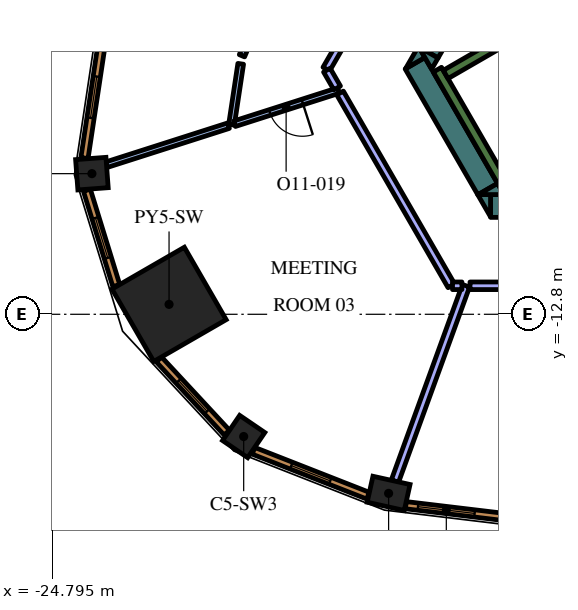
"""IFC4 building model, lengths in metres.
Left out: names, types, materials, properties, quantities, classifications, styles, units other than length and angle.
Written with IfcOpenShell. Run it as: python <this file> out.ifc"""

import sys

from ifc_helpers import new_model, si_unit, direction, frame, frame_2d, origin, origin_2d, place, context, subcontext, project, spatial, polyline, rectangle, outline, extrude, element, fill, save


model = new_model("IFC4")
c1 = context("Model", 3, precision=1e-05, world=origin(), true_north=direction((0.0, 1.0)))
c2 = subcontext(c1, "Body", "Model", "MODEL_VIEW")
j1 = project(units=[si_unit("LENGTHUNIT", "METRE"), si_unit("PLANEANGLEUNIT", "RADIAN")], contexts=[c1])
p1 = place(None, origin())
s1 = spatial("IfcSite", under=j1, at=p1, CompositionType="ELEMENT")
p2 = place(p1, origin())
s2 = spatial("IfcBuilding", under=s1, at=p2, CompositionType="ELEMENT")
p3 = place(p2, frame((0.0, 0.0, 267.0)))
s3 = spatial("IfcBuildingStorey", under=s2, at=p3, CompositionType="ELEMENT", Elevation=267.0)
p4 = place(p3, frame((-21.718, -12.539, 0.0), z_axis=(0.0, 0.0, 1.0), x_axis=(-0.866025403784, -0.5, 0.0)))
e1 = element("IfcColumn", 1, at=p4, inside=s3, PredefinedType="COLUMN", context=c2, shape_type="SweptSolid", body=[
    extrude(rectangle(XDim=2.2, YDim=2.2, at=origin_2d()), origin(), (0.0, 0.0, 1.0), 4.2),
])
p5 = place(p3, frame((-15.941, -17.512, 0.0), z_axis=(0.0, 0.0, 1.0), x_axis=(0.976233636503, -0.216720758026, 0.0)))
e2 = element("IfcColumn", 2, at=p5, inside=s3, PredefinedType="COLUMN", context=c2, shape_type="SweptSolid", body=[
    extrude(rectangle(XDim=1.0, YDim=0.7, at=origin_2d()), origin(), (0.0, 0.0, 1.0), 4.2),
])
for number, where, z_axis, x_axis in (
    (3, (-23.748, -9.1, 0.0), (0.0, 0.0, 1.0), (0.075, -0.997, 0.0)),
    (4, (-19.754, -16.017, 0.0), (0.0, 0.0, 1.0), (0.826, -0.563, 0.0)),
):
    element("IfcColumn", number, at=place(p3, frame(where, z_axis=z_axis, x_axis=x_axis)), inside=s3, PredefinedType="COLUMN", context=c2, shape_type="SweptSolid", body=[
        extrude(rectangle(XDim=0.8, YDim=0.8, at=origin_2d()), origin(), (0.0, 0.0, 1.0), 4.2),
    ])
p6 = place(p3, frame((8.904, -9.95, 0.0), z_axis=(0.0, 0.0, 1.0), x_axis=(-1.0, 0.0, 0.0)))
e5 = element("IfcWall", 5, at=p6, inside=s3, PredefinedType="SOLIDWALL", context=c2, shape_type="SweptSolid", body=[
    extrude(rectangle(XDim=22.161, YDim=0.6, at=frame_2d((11.081, 0.0))), origin(), (0.0, 0.0, 1.0), 4.2),
])
p7 = place(p3, origin())
e6 = element("IfcWall", 6, at=p7, inside=s3, PredefinedType="SOLIDWALL", context=c2, shape_type="SweptSolid", body=[
    extrude(outline(polyline([(-13.597, -9.65), (-13.259, -9.65), (-13.259, -10.236), (-13.597, -9.65)])), origin(), (0.0, 0.0, 1.0), 4.2),
])
p8 = place(p3, frame((-13.333, -9.506, 0.0), z_axis=(0.0, 0.0, 1.0), x_axis=(-0.500019073792, 0.866014391245, 0.0)))
e7 = element("IfcWall", 7, at=p8, inside=s3, PredefinedType="SOLIDWALL", context=c2, shape_type="SweptSolid", body=[
    extrude(rectangle(XDim=3.823, YDim=0.6, at=frame_2d((1.912, 0.0))), origin(), (0.0, 0.0, 1.0), 4.2),
])
e8 = element("IfcWall", 8, at=p7, inside=s3, PredefinedType="SOLIDWALL", context=c2, shape_type="SweptSolid", body=[
    extrude(outline(polyline([(-14.987, -6.043), (-15.493, -6.335), (-15.156, -5.75), (-14.987, -6.043)])), origin(), (0.0, 0.0, 1.0), 4.2),
])
e9 = element("IfcWall", 9, at=p7, inside=s3, PredefinedType="SOLIDWALL", context=c2, shape_type="SweptSolid", body=[
    extrude(outline(polyline([(-12.904, -9.65), (-13.58, -9.65), (-13.073, -9.357), (-12.904, -9.65)])), origin(), (0.0, 0.0, 1.0), 4.2),
])
p9 = place(p3, frame((-13.432, -3.364, 0.0), z_axis=(0.0, 0.0, 1.0), x_axis=(-0.499960127962, -0.866048422692, 0.0)))
e10 = element("IfcWall", 10, at=p9, inside=s3, PredefinedType="SOLIDWALL", context=c2, shape_type="SweptSolid", body=[
    extrude(rectangle(XDim=2.934, YDim=0.6, at=frame_2d((1.467, 0.0))), origin(), (0.0, 0.0, 1.0), 4.2),
])
e11 = element("IfcWall", 11, at=p7, inside=s3, PredefinedType="SOLIDWALL", context=c2, shape_type="SweptSolid", body=[
    extrude(outline(polyline([(-14.809, -6.35), (-15.147, -5.764), (-14.64, -6.057), (-14.809, -6.35)])), origin(), (0.0, 0.0, 1.0), 4.2),
])
p10 = place(p3, frame((-12.84, -9.511, 0.0), z_axis=(0.0, 0.0, 1.0), x_axis=(-0.499997733992, 0.866026712061, 0.0)))
e12 = element("IfcWall", 12, at=p10, inside=s3, PredefinedType="SOLIDWALL", context=c2, shape_type="SweptSolid", body=[
    extrude(rectangle(XDim=3.634, YDim=0.25, at=frame_2d((1.817, 0.0))), origin(), (0.0, 0.0, 1.0), 4.2),
])
p11 = place(p3, frame((-14.44, -6.49, 0.0), z_axis=(0.0, 0.0, 1.0), x_axis=(0.866022966069, 0.500004222222, 0.0)))
e13 = element("IfcWall", 13, at=p11, inside=s3, PredefinedType="SOLIDWALL", context=c2, shape_type="SweptSolid", body=[
    extrude(rectangle(XDim=6.8, YDim=0.25, at=frame_2d((3.4, 0.0))), origin(), (0.0, 0.0, 1.0), 4.2),
])
p12 = place(p3, frame((-15.774, -17.19, 0.0), z_axis=(0.0, 0.0, 1.0), x_axis=(0.341821907823, 0.93976474893, 0.0)))
e14 = element("IfcWall", 14, at=p12, inside=s3, PredefinedType="PARTITIONING", context=c2, shape_type="SweptSolid", body=[
    extrude(rectangle(XDim=5.469, YDim=0.2, at=frame_2d((2.735, 0.0))), origin(), (0.0, 0.0, 1.0), 3.55),
])
p13 = place(p3, frame((-13.799, -12.05, 0.0), z_axis=(0.0, 0.0, 1.0), x_axis=(1.0, 0.0, 0.0)))
e15 = element("IfcWall", 15, at=p13, inside=s3, PredefinedType="PARTITIONING", context=c2, shape_type="SweptSolid", body=[
    extrude(rectangle(XDim=7.769, YDim=0.2, at=frame_2d((3.884, 0.0))), origin(), (0.0, 0.0, 1.0), 3.55),
])
p14 = place(p3, frame((-19.8, -5.998, 0.0), z_axis=(0.0, 0.0, 1.0), x_axis=(0.39332238233, 0.919400621904, 0.0)))
e16 = element("IfcWall", 16, at=p14, inside=s3, PredefinedType="PARTITIONING", context=c2, shape_type="SweptSolid", body=[
    extrude(rectangle(XDim=5.431, YDim=0.15, at=frame_2d((2.715, 0.0))), origin(), (0.0, 0.0, 1.0), 3.55),
])
p15 = place(p14, frame((2.231, 0.0, 0.0)))
e17 = element("IfcOpeningElement", 17, at=p15, cuts=e16, PredefinedType="OPENING", context=c2, shape_type="SweptSolid", body=[
    extrude(rectangle(XDim=0.9, YDim=2.1, at=frame_2d((0.45, 1.05))), frame((0.0, 0.085, 0.0), z_axis=(0.0, -1.0, 0.0), x_axis=(1.0, 0.0, 0.0)), (0.0, 0.0, 1.0), 0.17),
])
p16 = place(p3, frame((-19.833, -6.21, 0.0), z_axis=(0.0, 0.0, 1.0), x_axis=(-0.149305499664, -0.988791114326, 0.0)))
e18 = element("IfcWall", 18, at=p16, inside=s3, PredefinedType="PARTITIONING", context=c2, shape_type="SweptSolid", body=[
    extrude(rectangle(XDim=1.62, YDim=0.15, at=frame_2d((0.81, 0.0))), origin(), (0.0, 0.0, 1.0), 3.55),
])
p17 = place(p3, frame((-20.154, -7.838, 0.0), z_axis=(0.0, 0.0, 1.0), x_axis=(-0.952501497002, -0.304533903217, 0.0)))
e19 = element("IfcWall", 19, at=p17, inside=s3, PredefinedType="PARTITIONING", context=c2, shape_type="SweptSolid", body=[
    extrude(rectangle(XDim=3.37, YDim=0.15, at=frame_2d((1.685, 0.0))), origin(), (0.0, 0.0, 1.0), 3.55),
])
p18 = place(p3, frame((-17.256, -6.911, 0.0), z_axis=(0.0, 0.0, 1.0), x_axis=(-0.95247639241, -0.304612412587, 0.0)))
e20 = element("IfcWall", 20, at=p18, inside=s3, PredefinedType="PARTITIONING", context=c2, shape_type="SweptSolid", body=[
    extrude(rectangle(XDim=2.875, YDim=0.15, at=frame_2d((1.438, 0.0))), origin(), (0.0, 0.0, 1.0), 3.55),
])
p19 = place(p18, frame((1.0, 0.0, 0.0)))
e21 = element("IfcOpeningElement", 21, at=p19, cuts=e20, PredefinedType="OPENING", context=c2, shape_type="SweptSolid", body=[
    extrude(rectangle(XDim=0.9, YDim=2.1, at=frame_2d((0.45, 1.05))), frame((0.0, 0.085, 0.0), z_axis=(0.0, -1.0, 0.0), x_axis=(1.0, 0.0, 0.0)), (0.0, 0.0, 1.0), 0.17),
])
p20 = place(p3, frame((-13.451, 0.803, 0.0), z_axis=(0.0, 0.0, 1.0), x_axis=(-0.499982585408, -0.86603545787, 0.0)))
e22 = element("IfcWall", 22, at=p20, inside=s3, PredefinedType="PARTITIONING", context=c2, shape_type="SweptSolid", body=[
    extrude(rectangle(XDim=8.26, YDim=0.2, at=frame_2d((4.13, 0.0))), origin(), (0.0, 0.0, 1.0), 3.55),
])
p21 = place(p3, frame((-17.565, -6.376, 0.0), z_axis=(0.0, 0.0, 1.0), x_axis=(0.499683376352, -0.866208129376, 0.0)))
e23 = element("IfcWall", 23, at=p21, inside=s3, PredefinedType="PARTITIONING", context=c2, shape_type="SweptSolid", body=[
    extrude(rectangle(XDim=0.541, YDim=0.2, at=frame_2d((0.271, 0.0))), origin(), (0.0, 0.0, 1.0), 3.55),
])
p22 = place(p3, frame((-17.218, -6.978, 0.0), z_axis=(0.0, 0.0, 1.0), x_axis=(0.500012299885, -0.866018302326, 0.0)))
e24 = element("IfcWall", 24, at=p22, inside=s3, PredefinedType="PARTITIONING", context=c2, shape_type="SweptSolid", body=[
    extrude(rectangle(XDim=5.857, YDim=0.2, at=frame_2d((2.929, 0.0))), origin(), (0.0, 0.0, 1.0), 3.55),
])
p23 = place(p3, frame((-14.26, -12.05, 0.0), z_axis=(0.0, 0.0, 1.0), x_axis=(1.0, 0.0, 0.0)))
e25 = element("IfcWall", 25, at=p23, inside=s3, PredefinedType="PARTITIONING", context=c2, shape_type="SweptSolid", body=[
    extrude(rectangle(XDim=0.248, YDim=0.2, at=frame_2d((0.124, 0.0))), origin(), (0.0, 0.0, 1.0), 3.55),
])
p24 = place(p3, frame((-15.487, -17.823, 0.0), z_axis=(0.0, 0.0, 1.0), x_axis=(0.992885582795, -0.119072328769, 0.0)))
e26 = element("IfcWall", 26, at=p24, inside=s3, PredefinedType="SOLIDWALL", context=c2, shape_type="SweptSolid", body=[
    extrude(rectangle(XDim=5.415, YDim=0.19, at=frame_2d((2.708, 0.0))), origin(), (0.0, 0.0, 1.0), 3.95),
])
p25 = place(p24, frame((0.323, 0.0, 0.6)))
e27 = element("IfcOpeningElement", 27, at=p25, cuts=e26, PredefinedType="OPENING", context=c2, shape_type="SweptSolid", body=[
    extrude(rectangle(XDim=1.5, YDim=2.85, at=frame_2d((0.75, 1.425))), frame((0.0, 0.105, 0.0), z_axis=(0.0, -1.0, 0.0), x_axis=(1.0, 0.0, 0.0)), (0.0, 0.0, 1.0), 0.21),
])
p26 = place(p24, frame((3.558, 0.0, 0.6)))
e28 = element("IfcOpeningElement", 28, at=p26, cuts=e26, PredefinedType="OPENING", context=c2, shape_type="SweptSolid", body=[
    extrude(rectangle(XDim=1.5, YDim=2.85, at=frame_2d((0.75, 1.425))), frame((0.0, 0.105, 0.0), z_axis=(0.0, -1.0, 0.0), x_axis=(1.0, 0.0, 0.0)), (0.0, 0.0, 1.0), 0.21),
])
p27 = place(p3, frame((-23.46, -5.488, 0.0), z_axis=(0.0, 0.0, 1.0), x_axis=(-0.149421055602, -0.988773658702, 0.0)))
e29 = element("IfcWall", 29, at=p27, inside=s3, PredefinedType="SOLIDWALL", context=c2, shape_type="SweptSolid", body=[
    extrude(rectangle(XDim=3.237, YDim=0.19, at=frame_2d((1.618, 0.0))), origin(), (0.0, 0.0, 1.0), 3.95),
])
p28 = place(p27, frame((1.068, 0.0, 0.6)))
e30 = element("IfcOpeningElement", 30, at=p28, cuts=e29, PredefinedType="OPENING", context=c2, shape_type="SweptSolid", body=[
    extrude(rectangle(XDim=1.1, YDim=2.85, at=frame_2d((0.55, 1.425))), frame((0.0, 0.105, 0.0), z_axis=(0.0, -1.0, 0.0), x_axis=(1.0, 0.0, 0.0)), (0.0, 0.0, 1.0), 0.21),
])
p29 = place(p3, frame((-23.881, -9.535, 0.0), z_axis=(0.0, 0.0, 1.0), x_axis=(0.294706210429, -0.9555879078, 0.0)))
e31 = element("IfcWall", 31, at=p29, inside=s3, PredefinedType="SOLIDWALL", context=c2, shape_type="SweptSolid", body=[
    extrude(rectangle(XDim=2.627, YDim=0.19, at=frame_2d((1.313, 0.0))), origin(), (0.0, 0.0, 1.0), 3.95),
])
p30 = place(p29, frame((0.763, 0.0, 0.6)))
e32 = element("IfcOpeningElement", 32, at=p30, cuts=e31, PredefinedType="OPENING", context=c2, shape_type="SweptSolid", body=[
    extrude(rectangle(XDim=1.1, YDim=2.85, at=frame_2d((0.55, 1.425))), frame((0.0, 0.105, 0.0), z_axis=(0.0, -1.0, 0.0), x_axis=(1.0, 0.0, 0.0)), (0.0, 0.0, 1.0), 0.21),
])
p31 = place(p3, frame((-21.985, -13.988, 0.0), z_axis=(0.0, 0.0, 1.0), x_axis=(0.680219354823, -0.733008614768, 0.0)))
e33 = element("IfcWall", 33, at=p31, inside=s3, PredefinedType="SOLIDWALL", context=c2, shape_type="SweptSolid", body=[
    extrude(rectangle(XDim=2.627, YDim=0.19, at=frame_2d((1.313, 0.0))), origin(), (0.0, 0.0, 1.0), 3.95),
])
p32 = place(p31, frame((0.763, 0.0, 0.6)))
e34 = element("IfcOpeningElement", 34, at=p32, cuts=e33, PredefinedType="OPENING", context=c2, shape_type="SweptSolid", body=[
    extrude(rectangle(XDim=1.1, YDim=2.85, at=frame_2d((0.55, 1.425))), frame((0.0, 0.105, 0.0), z_axis=(0.0, -1.0, 0.0), x_axis=(1.0, 0.0, 0.0)), (0.0, 0.0, 1.0), 0.21),
])
p33 = place(p3, frame((-19.496, -16.392, 0.0), z_axis=(0.0, 0.0, 1.0), x_axis=(0.93100888477, -0.364996515709, 0.0)))
e35 = element("IfcWall", 35, at=p33, inside=s3, PredefinedType="SOLIDWALL", context=c2, shape_type="SweptSolid", body=[
    extrude(rectangle(XDim=3.237, YDim=0.19, at=frame_2d((1.618, 0.0))), origin(), (0.0, 0.0, 1.0), 3.95),
])
p34 = place(p33, frame((1.068, 0.0, 0.6)))
e36 = element("IfcOpeningElement", 36, at=p34, cuts=e35, PredefinedType="OPENING", context=c2, shape_type="SweptSolid", body=[
    extrude(rectangle(XDim=1.1, YDim=2.85, at=frame_2d((0.55, 1.425))), frame((0.0, 0.105, 0.0), z_axis=(0.0, -1.0, 0.0), x_axis=(1.0, 0.0, 0.0)), (0.0, 0.0, 1.0), 0.21),
])
p35 = place(p19, origin())
e37 = element("IfcDoor", 37, at=p35, inside=s3, OperationType="SINGLE_SWING_RIGHT", PredefinedType="DOOR", context=c2, shape_type="SweptSolid", body=[
    extrude(rectangle(XDim=0.9, YDim=2.1, at=frame_2d((0.45, 1.05))), frame((0.0, 0.025, 0.0), z_axis=(0.0, -1.0, 0.0), x_axis=(1.0, 0.0, 0.0)), (0.0, 0.0, 1.0), 0.05),
])
fill(e21, e37)
p36 = place(p25, origin())
e38 = element("IfcWindow", 38, at=p36, inside=s3, PartitioningType="SINGLE_PANEL", PredefinedType="WINDOW", context=c2, shape_type="SweptSolid", body=[
    extrude(rectangle(XDim=1.5, YDim=2.85, at=frame_2d((0.75, 1.425))), frame((0.0, 0.045, 0.0), z_axis=(0.0, -1.0, 0.0), x_axis=(1.0, 0.0, 0.0)), (0.0, 0.0, 1.0), 0.06),
])
fill(e27, e38)
p37 = place(p28, origin())
e39 = element("IfcWindow", 39, at=p37, inside=s3, PartitioningType="SINGLE_PANEL", PredefinedType="WINDOW", context=c2, shape_type="SweptSolid", body=[
    extrude(rectangle(XDim=1.1, YDim=2.85, at=frame_2d((0.55, 1.425))), frame((0.0, 0.045, 0.0), z_axis=(0.0, -1.0, 0.0), x_axis=(1.0, 0.0, 0.0)), (0.0, 0.0, 1.0), 0.06),
])
fill(e30, e39)
p38 = place(p30, origin())
e40 = element("IfcWindow", 40, at=p38, inside=s3, PartitioningType="SINGLE_PANEL", PredefinedType="WINDOW", context=c2, shape_type="SweptSolid", body=[
    extrude(rectangle(XDim=1.1, YDim=2.85, at=frame_2d((0.55, 1.425))), frame((0.0, 0.045, 0.0), z_axis=(0.0, -1.0, 0.0), x_axis=(1.0, 0.0, 0.0)), (0.0, 0.0, 1.0), 0.06),
])
fill(e32, e40)
p39 = place(p32, origin())
e41 = element("IfcWindow", 41, at=p39, inside=s3, PartitioningType="SINGLE_PANEL", PredefinedType="WINDOW", context=c2, shape_type="SweptSolid", body=[
    extrude(rectangle(XDim=1.1, YDim=2.85, at=frame_2d((0.55, 1.425))), frame((0.0, 0.045, 0.0), z_axis=(0.0, -1.0, 0.0), x_axis=(1.0, 0.0, 0.0)), (0.0, 0.0, 1.0), 0.06),
])
fill(e34, e41)
p40 = place(p34, origin())
e42 = element("IfcWindow", 42, at=p40, inside=s3, PartitioningType="SINGLE_PANEL", PredefinedType="WINDOW", context=c2, shape_type="SweptSolid", body=[
    extrude(rectangle(XDim=1.1, YDim=2.85, at=frame_2d((0.55, 1.425))), frame((0.0, 0.045, 0.0), z_axis=(0.0, -1.0, 0.0), x_axis=(1.0, 0.0, 0.0)), (0.0, 0.0, 1.0), 0.06),
])
fill(e36, e42)
save(model, sys.argv[1])
